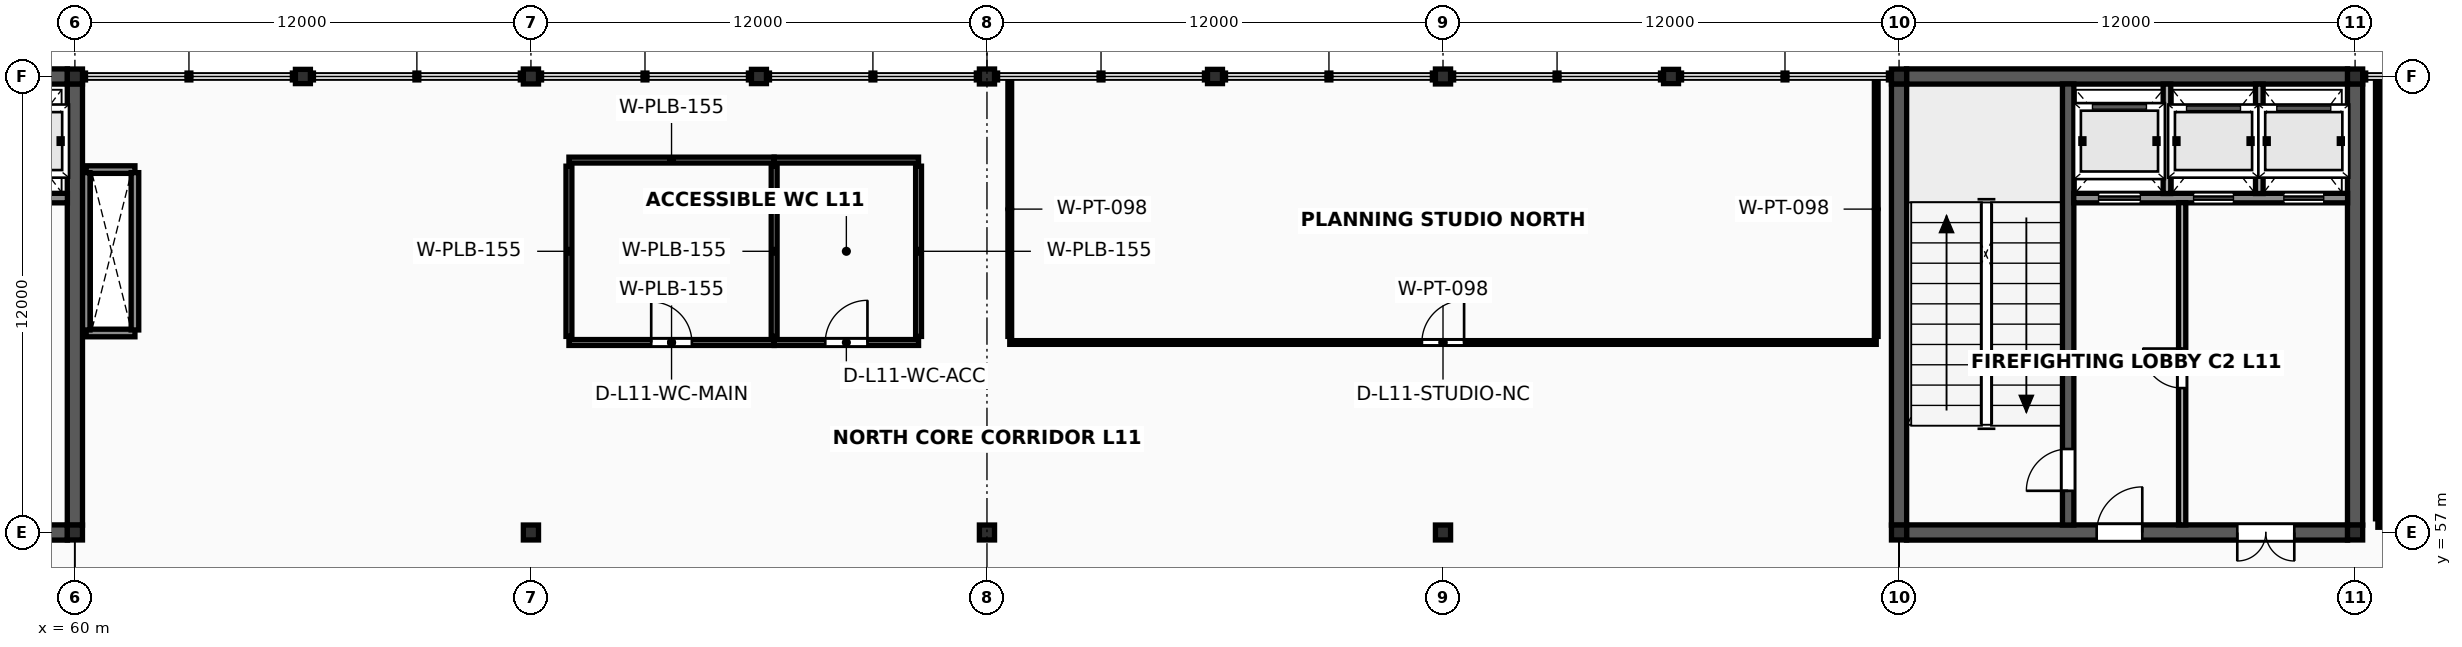
"""IFC4 building model, lengths in metres.
Left out: names, types, materials, properties, quantities, classifications, styles, units other than length and angle.
Written with IfcOpenShell. Run it as: python <this file> out.ifc"""

import sys

from ifc_helpers import new_model, si_unit, direction, frame, frame_2d, origin, origin_2d, place, context, subcontext, project, spatial, rectangle, i_section, extrude, element, fill, save


model = new_model("IFC4")
c1 = context("Model", 3, precision=1e-05, world=origin(), true_north=direction((0.0, 1.0)))
c2 = subcontext(c1, "Body", "Model", "MODEL_VIEW")
j1 = project(units=[si_unit("LENGTHUNIT", "METRE"), si_unit("PLANEANGLEUNIT", "RADIAN")], contexts=[c1])
p1 = place(None, origin())
s1 = spatial("IfcSite", under=j1, at=p1, CompositionType="ELEMENT")
p2 = place(p1, origin())
s2 = spatial("IfcBuilding", under=s1, at=p2, CompositionType="ELEMENT")
p3 = place(p2, frame((0.0, 0.0, 45.6)))
s3 = spatial("IfcBuildingStorey", under=s2, at=p3, CompositionType="ELEMENT", Elevation=45.6)
for number, where, z_axis, x_axis in (
    (1, (60.0, 57.0, 0.0), (0.0, 0.0, 1.0), (1.0, 0.0, 0.0)),
    (2, (60.0, 69.0, 0.0), (0.0, 0.0, 1.0), (1.0, 0.0, 0.0)),
    (3, (72.0, 57.0, 0.0), (0.0, 0.0, 1.0), (1.0, 0.0, 0.0)),
    (4, (72.0, 69.0, 0.0), (0.0, 0.0, 1.0), (1.0, 0.0, 0.0)),
    (5, (84.0, 57.0, 0.0), (0.0, 0.0, 1.0), (1.0, 0.0, 0.0)),
    (6, (84.0, 69.0, 0.0), (0.0, 0.0, 1.0), (1.0, 0.0, 0.0)),
    (7, (96.0, 57.0, 0.0), (0.0, 0.0, 1.0), (1.0, 0.0, 0.0)),
    (8, (96.0, 69.0, 0.0), (0.0, 0.0, 1.0), (1.0, 0.0, 0.0)),
    (9, (108.0, 57.0, 0.0), (0.0, 0.0, 1.0), (1.0, 0.0, 0.0)),
    (10, (108.0, 69.0, 0.0), (0.0, 0.0, 1.0), (1.0, 0.0, 0.0)),
    (11, (120.0, 57.0, 0.0), (0.0, 0.0, 1.0), (1.0, 0.0, 0.0)),
    (12, (120.0, 69.0, 0.0), (0.0, 0.0, 1.0), (1.0, 0.0, 0.0)),
):
    element("IfcColumn", number, at=place(p3, frame(where, z_axis=z_axis, x_axis=x_axis)), inside=s3, PredefinedType="COLUMN", context=c2, shape_type="SweptSolid", body=[
        extrude(i_section(OverallWidth=0.399, OverallDepth=0.393, WebThickness=0.023, FlangeThickness=0.037, FilletRadius=0.018, at=origin_2d()), origin(), (0.0, 0.0, 1.0), 4.0),
    ])
for number, where, z_axis, x_axis in (
    (13, (66.0, 69.0, 0.0), (0.0, 0.0, 1.0), (1.0, 0.0, 0.0)),
    (14, (78.0, 69.0, 0.0), (0.0, 0.0, 1.0), (1.0, 0.0, 0.0)),
    (15, (90.0, 69.0, 0.0), (0.0, 0.0, 1.0), (1.0, 0.0, 0.0)),
    (16, (102.0, 69.0, 0.0), (0.0, 0.0, 1.0), (1.0, 0.0, 0.0)),
):
    element("IfcColumn", number, at=place(p3, frame(where, z_axis=z_axis, x_axis=x_axis)), inside=s3, PredefinedType="COLUMN", context=c2, shape_type="SweptSolid", body=[
        extrude(i_section(OverallWidth=0.394, OverallDepth=0.375, WebThickness=0.017, FlangeThickness=0.028, FilletRadius=0.018, at=origin_2d()), origin(), (0.0, 0.0, 1.0), 4.0),
    ])
for number, where, z_axis, x_axis in (
    (17, (60.297, 62.25, 0.0), (0.0, 0.0, 1.0), (1.0, 0.0, 0.0)),
    (18, (60.297, 66.55, 0.0), (0.0, 0.0, 1.0), (1.0, 0.0, 0.0)),
):
    element("IfcWall", number, at=place(p3, frame(where, z_axis=z_axis, x_axis=x_axis)), inside=s3, PredefinedType="SOLIDWALL", context=c2, shape_type="SweptSolid", body=[
        extrude(rectangle(XDim=1.283, YDim=0.2, at=frame_2d((0.642, 0.0))), origin(), (0.0, 0.0, 1.0), 3.843),
    ])
for number, where, z_axis, x_axis in (
    (19, (60.297, 62.33, 0.0), (0.0, 0.0, 1.0), (0.0, 1.0, 0.0)),
    (20, (61.58, 62.33, 0.0), (0.0, 0.0, 1.0), (0.0, 1.0, 0.0)),
):
    element("IfcWall", number, at=place(p3, frame(where, z_axis=z_axis, x_axis=x_axis)), inside=s3, PredefinedType="SOLIDWALL", context=c2, shape_type="SweptSolid", body=[
        extrude(rectangle(XDim=4.14, YDim=0.2, at=frame_2d((2.07, 0.0))), origin(), (0.0, 0.0, 1.0), 3.843),
    ])
p4 = place(p3, frame((48.197, 57.0, 0.0), z_axis=(0.0, 0.0, 1.0), x_axis=(1.0, 0.0, 0.0)))
e21 = element("IfcWall", 21, at=p4, inside=s3, PredefinedType="SHEAR", context=c2, shape_type="SweptSolid", body=[
    extrude(rectangle(XDim=11.607, YDim=0.4, at=frame_2d((5.803, 0.0))), origin(), (0.0, 0.0, 1.0), 3.843),
])
p5 = place(p4, frame((5.004, 0.0, 0.0)))
e22 = element("IfcOpeningElement", 22, at=p5, cuts=e21, PredefinedType="OPENING", context=c2, shape_type="SweptSolid", body=[
    extrude(rectangle(XDim=1.2, YDim=2.2, at=frame_2d((0.6, 1.1))), frame((0.0, 0.215, 0.0), z_axis=(0.0, -1.0, 0.0), x_axis=(1.0, 0.0, 0.0)), (0.0, 0.0, 1.0), 0.43),
])
p6 = place(p4, frame((8.703, 0.0, 0.0)))
e23 = element("IfcOpeningElement", 23, at=p6, cuts=e21, PredefinedType="OPENING", context=c2, shape_type="SweptSolid", body=[
    extrude(rectangle(XDim=1.5, YDim=2.25, at=frame_2d((0.75, 1.125))), frame((0.0, 0.215, 0.0), z_axis=(0.0, -1.0, 0.0), x_axis=(1.0, 0.0, 0.0)), (0.0, 0.0, 1.0), 0.43),
])
p7 = place(p3, frame((48.197, 69.0, 0.0), z_axis=(0.0, 0.0, 1.0), x_axis=(1.0, 0.0, 0.0)))
e24 = element("IfcWall", 24, at=p7, inside=s3, PredefinedType="SHEAR", context=c2, shape_type="SweptSolid", body=[
    extrude(rectangle(XDim=11.607, YDim=0.4, at=frame_2d((5.803, 0.0))), origin(), (0.0, 0.0, 1.0), 3.843),
])
p8 = place(p3, frame((60.0, 57.194, 0.0), z_axis=(0.0, 0.0, 1.0), x_axis=(0.0, 1.0, 0.0)))
e25 = element("IfcWall", 25, at=p8, inside=s3, PredefinedType="SHEAR", context=c2, shape_type="SweptSolid", body=[
    extrude(rectangle(XDim=11.613, YDim=0.4, at=frame_2d((5.806, 0.0))), origin(), (0.0, 0.0, 1.0), 3.843),
])
p9 = place(p3, frame((52.597, 65.8, 0.0), z_axis=(0.0, 0.0, 1.0), x_axis=(1.0, 0.0, 0.0)))
e26 = element("IfcWall", 26, at=p9, inside=s3, PredefinedType="SOLIDWALL", context=c2, shape_type="SweptSolid", body=[
    extrude(rectangle(XDim=7.206, YDim=0.25, at=frame_2d((3.603, 0.0))), origin(), (0.0, 0.0, 1.0), 3.843),
])
p10 = place(p9, frame((0.653, 0.0, 0.0)))
e27 = element("IfcOpeningElement", 27, at=p10, cuts=e26, PredefinedType="OPENING", context=c2, shape_type="SweptSolid", body=[
    extrude(rectangle(XDim=1.1, YDim=2.24, at=frame_2d((0.55, 1.12))), frame((0.0, 0.14, 0.0), z_axis=(0.0, -1.0, 0.0), x_axis=(1.0, 0.0, 0.0)), (0.0, 0.0, 1.0), 0.28),
])
p11 = place(p9, frame((3.153, 0.0, 0.0)))
e28 = element("IfcOpeningElement", 28, at=p11, cuts=e26, PredefinedType="OPENING", context=c2, shape_type="SweptSolid", body=[
    extrude(rectangle(XDim=1.05, YDim=2.2, at=frame_2d((0.525, 1.1))), frame((0.0, 0.14, 0.0), z_axis=(0.0, -1.0, 0.0), x_axis=(1.0, 0.0, 0.0)), (0.0, 0.0, 1.0), 0.28),
])
p12 = place(p9, frame((5.528, 0.0, 0.0)))
e29 = element("IfcOpeningElement", 29, at=p12, cuts=e26, PredefinedType="OPENING", context=c2, shape_type="SweptSolid", body=[
    extrude(rectangle(XDim=1.05, YDim=2.2, at=frame_2d((0.525, 1.1))), frame((0.0, 0.14, 0.0), z_axis=(0.0, -1.0, 0.0), x_axis=(1.0, 0.0, 0.0)), (0.0, 0.0, 1.0), 0.28),
])
p13 = place(p3, frame((108.197, 57.0, 0.0), z_axis=(0.0, 0.0, 1.0), x_axis=(1.0, 0.0, 0.0)))
e30 = element("IfcWall", 30, at=p13, inside=s3, PredefinedType="SHEAR", context=c2, shape_type="SweptSolid", body=[
    extrude(rectangle(XDim=11.607, YDim=0.4, at=frame_2d((5.803, 0.0))), origin(), (0.0, 0.0, 1.0), 3.843),
])
p14 = place(p13, frame((5.004, 0.0, 0.0)))
e31 = element("IfcOpeningElement", 31, at=p14, cuts=e30, PredefinedType="OPENING", context=c2, shape_type="SweptSolid", body=[
    extrude(rectangle(XDim=1.2, YDim=2.2, at=frame_2d((0.6, 1.1))), frame((0.0, 0.215, 0.0), z_axis=(0.0, -1.0, 0.0), x_axis=(1.0, 0.0, 0.0)), (0.0, 0.0, 1.0), 0.43),
])
p15 = place(p13, frame((8.704, 0.0, 0.0)))
e32 = element("IfcOpeningElement", 32, at=p15, cuts=e30, PredefinedType="OPENING", context=c2, shape_type="SweptSolid", body=[
    extrude(rectangle(XDim=1.5, YDim=2.25, at=frame_2d((0.75, 1.125))), frame((0.0, 0.215, 0.0), z_axis=(0.0, -1.0, 0.0), x_axis=(1.0, 0.0, 0.0)), (0.0, 0.0, 1.0), 0.43),
])
p16 = place(p3, frame((108.197, 69.0, 0.0), z_axis=(0.0, 0.0, 1.0), x_axis=(1.0, 0.0, 0.0)))
e33 = element("IfcWall", 33, at=p16, inside=s3, PredefinedType="SHEAR", context=c2, shape_type="SweptSolid", body=[
    extrude(rectangle(XDim=11.607, YDim=0.4, at=frame_2d((5.803, 0.0))), origin(), (0.0, 0.0, 1.0), 3.843),
])
for number, where, z_axis, x_axis in (
    (34, (108.0, 57.194, 0.0), (0.0, 0.0, 1.0), (0.0, 1.0, 0.0)),
    (35, (120.0, 57.194, 0.0), (0.0, 0.0, 1.0), (0.0, 1.0, 0.0)),
):
    element("IfcWall", number, at=place(p3, frame(where, z_axis=z_axis, x_axis=x_axis)), inside=s3, PredefinedType="SHEAR", context=c2, shape_type="SweptSolid", body=[
        extrude(rectangle(XDim=11.613, YDim=0.4, at=frame_2d((5.806, 0.0))), origin(), (0.0, 0.0, 1.0), 3.843),
    ])
p17 = place(p3, frame((112.45, 57.197, 0.0), z_axis=(0.0, 0.0, 1.0), x_axis=(0.0, 1.0, 0.0)))
e36 = element("IfcWall", 36, at=p17, inside=s3, PredefinedType="SHEAR", context=c2, shape_type="SweptSolid", body=[
    extrude(rectangle(XDim=11.606, YDim=0.3, at=frame_2d((5.803, 0.0))), origin(), (0.0, 0.0, 1.0), 3.843),
])
p18 = place(p17, frame((0.9, 0.0, 0.0)))
e37 = element("IfcOpeningElement", 37, at=p18, cuts=e36, PredefinedType="OPENING", context=c2, shape_type="SweptSolid", body=[
    extrude(rectangle(XDim=1.1, YDim=2.2, at=frame_2d((0.55, 1.1))), frame((0.0, 0.165, 0.0), z_axis=(0.0, -1.0, 0.0), x_axis=(1.0, 0.0, 0.0)), (0.0, 0.0, 1.0), 0.33),
])
p19 = place(p3, frame((112.597, 65.8, 0.0), z_axis=(0.0, 0.0, 1.0), x_axis=(1.0, 0.0, 0.0)))
e38 = element("IfcWall", 38, at=p19, inside=s3, PredefinedType="SOLIDWALL", context=c2, shape_type="SweptSolid", body=[
    extrude(rectangle(XDim=7.206, YDim=0.25, at=frame_2d((3.603, 0.0))), origin(), (0.0, 0.0, 1.0), 3.843),
])
p20 = place(p19, frame((0.653, 0.0, 0.0)))
e39 = element("IfcOpeningElement", 39, at=p20, cuts=e38, PredefinedType="OPENING", context=c2, shape_type="SweptSolid", body=[
    extrude(rectangle(XDim=1.1, YDim=2.24, at=frame_2d((0.55, 1.12))), frame((0.0, 0.14, 0.0), z_axis=(0.0, -1.0, 0.0), x_axis=(1.0, 0.0, 0.0)), (0.0, 0.0, 1.0), 0.28),
])
p21 = place(p19, frame((3.153, 0.0, 0.0)))
e40 = element("IfcOpeningElement", 40, at=p21, cuts=e38, PredefinedType="OPENING", context=c2, shape_type="SweptSolid", body=[
    extrude(rectangle(XDim=1.05, YDim=2.2, at=frame_2d((0.525, 1.1))), frame((0.0, 0.14, 0.0), z_axis=(0.0, -1.0, 0.0), x_axis=(1.0, 0.0, 0.0)), (0.0, 0.0, 1.0), 0.28),
])
p22 = place(p19, frame((5.528, 0.0, 0.0)))
e41 = element("IfcOpeningElement", 41, at=p22, cuts=e38, PredefinedType="OPENING", context=c2, shape_type="SweptSolid", body=[
    extrude(rectangle(XDim=1.05, YDim=2.2, at=frame_2d((0.525, 1.1))), frame((0.0, 0.14, 0.0), z_axis=(0.0, -1.0, 0.0), x_axis=(1.0, 0.0, 0.0)), (0.0, 0.0, 1.0), 0.28),
])
for number, where, z_axis, x_axis in (
    (42, (115.05, 65.92, 0.0), (0.0, 0.0, 1.0), (0.0, 1.0, 0.0)),
    (43, (117.48, 65.92, 0.0), (0.0, 0.0, 1.0), (0.0, 1.0, 0.0)),
):
    element("IfcWall", number, at=place(p3, frame(where, z_axis=z_axis, x_axis=x_axis)), inside=s3, PredefinedType="SOLIDWALL", context=c2, shape_type="SweptSolid", body=[
        extrude(rectangle(XDim=2.88, YDim=0.2, at=frame_2d((1.44, 0.0))), origin(), (0.0, 0.0, 1.0), 3.833),
    ])
p23 = place(p3, frame((115.45, 57.2, 0.0), z_axis=(0.0, 0.0, 1.0), x_axis=(0.0, 1.0, 0.0)))
e44 = element("IfcWall", 44, at=p23, inside=s3, PredefinedType="SOLIDWALL", context=c2, shape_type="SweptSolid", body=[
    extrude(rectangle(XDim=8.48, YDim=0.19, at=frame_2d((4.24, 0.0))), origin(), (0.0, 0.0, 1.0), 3.833),
])
p24 = place(p23, frame((3.6, 0.0, 0.0)))
e45 = element("IfcOpeningElement", 45, at=p24, cuts=e44, PredefinedType="OPENING", context=c2, shape_type="SweptSolid", body=[
    extrude(rectangle(XDim=1.04, YDim=2.18, at=frame_2d((0.52, 1.09))), frame((0.0, 0.11, 0.0), z_axis=(0.0, -1.0, 0.0), x_axis=(1.0, 0.0, 0.0)), (0.0, 0.0, 1.0), 0.22),
])
p25 = place(p3, frame((73.0, 62.0, 0.0), z_axis=(0.0, 0.0, 1.0), x_axis=(1.0, 0.0, 0.0)))
e46 = element("IfcWall", 46, at=p25, inside=s3, PredefinedType="PLUMBINGWALL", context=c2, shape_type="SweptSolid", body=[
    extrude(rectangle(XDim=5.4, YDim=0.155, at=frame_2d((2.7, 0.0))), origin(), (0.0, 0.0, 1.0), 2.88),
])
p26 = place(p25, frame((2.165, 0.0, 0.0)))
e47 = element("IfcOpeningElement", 47, at=p26, cuts=e46, PredefinedType="OPENING", context=c2, shape_type="SweptSolid", body=[
    extrude(rectangle(XDim=1.07, YDim=2.19, at=frame_2d((0.535, 1.095))), frame((0.0, 0.093, 0.0), z_axis=(0.0, -1.0, 0.0), x_axis=(1.0, 0.0, 0.0)), (0.0, 0.0, 1.0), 0.185),
])
p27 = place(p3, frame((73.0, 66.8, 0.0), z_axis=(0.0, 0.0, 1.0), x_axis=(1.0, 0.0, 0.0)))
e48 = element("IfcWall", 48, at=p27, inside=s3, PredefinedType="PLUMBINGWALL", context=c2, shape_type="SweptSolid", body=[
    extrude(rectangle(XDim=5.4, YDim=0.155, at=frame_2d((2.7, 0.0))), origin(), (0.0, 0.0, 1.0), 2.88),
])
for number, where, z_axis, x_axis in (
    (49, (73.0, 62.16, 0.0), (0.0, 0.0, 1.0), (0.0, 1.0, 0.0)),
    (50, (78.4, 62.16, 0.0), (0.0, 0.0, 1.0), (0.0, 1.0, 0.0)),
):
    element("IfcWall", number, at=place(p3, frame(where, z_axis=z_axis, x_axis=x_axis)), inside=s3, PredefinedType="PLUMBINGWALL", context=c2, shape_type="SweptSolid", body=[
        extrude(rectangle(XDim=4.48, YDim=0.155, at=frame_2d((2.24, 0.0))), origin(), (0.0, 0.0, 1.0), 2.88),
    ])
p28 = place(p3, frame((78.4, 62.0, 0.0), z_axis=(0.0, 0.0, 1.0), x_axis=(1.0, 0.0, 0.0)))
e51 = element("IfcWall", 51, at=p28, inside=s3, PredefinedType="PLUMBINGWALL", context=c2, shape_type="SweptSolid", body=[
    extrude(rectangle(XDim=3.8, YDim=0.155, at=frame_2d((1.9, 0.0))), origin(), (0.0, 0.0, 1.0), 2.88),
])
p29 = place(p28, frame((1.345, 0.0, 0.0)))
e52 = element("IfcOpeningElement", 52, at=p29, cuts=e51, PredefinedType="OPENING", context=c2, shape_type="SweptSolid", body=[
    extrude(rectangle(XDim=1.11, YDim=2.21, at=frame_2d((0.555, 1.105))), frame((0.0, 0.093, 0.0), z_axis=(0.0, -1.0, 0.0), x_axis=(1.0, 0.0, 0.0)), (0.0, 0.0, 1.0), 0.185),
])
p30 = place(p3, frame((78.4, 66.8, 0.0), z_axis=(0.0, 0.0, 1.0), x_axis=(1.0, 0.0, 0.0)))
e53 = element("IfcWall", 53, at=p30, inside=s3, PredefinedType="PLUMBINGWALL", context=c2, shape_type="SweptSolid", body=[
    extrude(rectangle(XDim=3.8, YDim=0.155, at=frame_2d((1.9, 0.0))), origin(), (0.0, 0.0, 1.0), 2.88),
])
p31 = place(p3, frame((82.2, 62.16, 0.0), z_axis=(0.0, 0.0, 1.0), x_axis=(0.0, 1.0, 0.0)))
e54 = element("IfcWall", 54, at=p31, inside=s3, PredefinedType="PLUMBINGWALL", context=c2, shape_type="SweptSolid", body=[
    extrude(rectangle(XDim=4.48, YDim=0.155, at=frame_2d((2.24, 0.0))), origin(), (0.0, 0.0, 1.0), 2.88),
])
p32 = place(p3, frame((84.6, 62.0, 0.0), z_axis=(0.0, 0.0, 1.0), x_axis=(1.0, 0.0, 0.0)))
e55 = element("IfcWall", 55, at=p32, inside=s3, PredefinedType="PARTITIONING", context=c2, shape_type="SweptSolid", body=[
    extrude(rectangle(XDim=22.8, YDim=0.098, at=frame_2d((11.4, 0.0))), origin(), (0.0, 0.0, 1.0), 2.88),
])
p33 = place(p32, frame((10.845, 0.0, 0.0)))
e56 = element("IfcOpeningElement", 56, at=p33, cuts=e55, PredefinedType="OPENING", context=c2, shape_type="SweptSolid", body=[
    extrude(rectangle(XDim=1.11, YDim=2.21, at=frame_2d((0.555, 1.105))), frame((0.0, 0.064, 0.0), z_axis=(0.0, -1.0, 0.0), x_axis=(1.0, 0.0, 0.0)), (0.0, 0.0, 1.0), 0.128),
])
for number, where, z_axis, x_axis in (
    (57, (84.6, 62.16, 0.0), (0.0, 0.0, 1.0), (0.0, 1.0, 0.0)),
    (58, (107.4, 62.16, 0.0), (0.0, 0.0, 1.0), (0.0, 1.0, 0.0)),
):
    element("IfcWall", number, at=place(p3, frame(where, z_axis=z_axis, x_axis=x_axis)), inside=s3, PredefinedType="PARTITIONING", context=c2, shape_type="SweptSolid", body=[
        extrude(rectangle(XDim=6.7, YDim=0.098, at=frame_2d((3.35, 0.0))), origin(), (0.0, 0.0, 1.0), 2.88),
    ])
p34 = place(p3, frame((120.6, 57.2, 0.0), z_axis=(0.0, 0.0, 1.0), x_axis=(1.0, 0.0, 0.0)))
e59 = element("IfcWall", 59, at=p34, inside=s3, PredefinedType="PARTITIONING", context=c2, shape_type="SweptSolid", body=[
    extrude(rectangle(XDim=23.26, YDim=0.125, at=frame_2d((11.63, 0.0))), origin(), (0.0, 0.0, 1.0), 2.88),
])
p35 = place(p34, frame((7.043, 0.0, 0.0)))
e60 = element("IfcOpeningElement", 60, at=p35, cuts=e59, PredefinedType="OPENING", context=c2, shape_type="SweptSolid", body=[
    extrude(rectangle(XDim=1.73, YDim=2.37, at=frame_2d((0.865, 1.185))), frame((0.0, 0.077, 0.0), z_axis=(0.0, -1.0, 0.0), x_axis=(1.0, 0.0, 0.0)), (0.0, 0.0, 1.0), 0.155),
])
p36 = place(p3, frame((120.6, 57.36, 0.0), z_axis=(0.0, 0.0, 1.0), x_axis=(0.0, 1.0, 0.0)))
e61 = element("IfcWall", 61, at=p36, inside=s3, PredefinedType="PARTITIONING", context=c2, shape_type="SweptSolid", body=[
    extrude(rectangle(XDim=11.5, YDim=0.125, at=frame_2d((5.75, 0.0))), origin(), (0.0, 0.0, 1.0), 2.88),
])
p37 = place(p18, origin())
e62 = element("IfcDoor", 62, at=p37, inside=s3, OperationType="SINGLE_SWING_LEFT", PredefinedType="DOOR", context=c2, shape_type="SweptSolid", body=[
    extrude(rectangle(XDim=1.1, YDim=2.2, at=frame_2d((0.55, 1.1))), frame((0.0, 0.025, 0.0), z_axis=(0.0, -1.0, 0.0), x_axis=(1.0, 0.0, 0.0)), (0.0, 0.0, 1.0), 0.05),
])
fill(e37, e62)
p38 = place(p24, origin())
e63 = element("IfcDoor", 63, at=p38, inside=s3, OperationType="SINGLE_SWING_RIGHT", PredefinedType="DOOR", context=c2, shape_type="SweptSolid", body=[
    extrude(rectangle(XDim=1.04, YDim=2.18, at=frame_2d((0.52, 1.09))), frame((0.0, 0.025, 0.0), z_axis=(0.0, -1.0, 0.0), x_axis=(1.0, 0.0, 0.0)), (0.0, 0.0, 1.0), 0.05),
])
fill(e45, e63)
p39 = place(p14, origin())
e64 = element("IfcDoor", 64, at=p39, inside=s3, OperationType="SINGLE_SWING_RIGHT", PredefinedType="DOOR", context=c2, shape_type="SweptSolid", body=[
    extrude(rectangle(XDim=1.2, YDim=2.2, at=frame_2d((0.6, 1.1))), frame((0.0, 0.025, 0.0), z_axis=(0.0, -1.0, 0.0), x_axis=(1.0, 0.0, 0.0)), (0.0, 0.0, 1.0), 0.05),
])
fill(e31, e64)
p40 = place(p15, origin())
e65 = element("IfcDoor", 65, at=p40, inside=s3, OperationType="DOUBLE_DOOR_SINGLE_SWING", PredefinedType="DOOR", context=c2, shape_type="SweptSolid", body=[
    extrude(rectangle(XDim=1.5, YDim=2.25, at=frame_2d((0.75, 1.125))), frame((0.0, 0.025, 0.0), z_axis=(0.0, -1.0, 0.0), x_axis=(1.0, 0.0, 0.0)), (0.0, 0.0, 1.0), 0.05),
])
fill(e32, e65)
p41 = place(p20, origin())
e66 = element("IfcDoor", 66, at=p41, inside=s3, OperationType="SLIDING_TO_LEFT", PredefinedType="USERDEFINED", context=c2, shape_type="SweptSolid", body=[
    extrude(rectangle(XDim=1.1, YDim=2.24, at=frame_2d((0.55, 1.12))), frame((0.0, 0.025, 0.0), z_axis=(0.0, -1.0, 0.0), x_axis=(1.0, 0.0, 0.0)), (0.0, 0.0, 1.0), 0.05),
])
fill(e39, e66)
p42 = place(p21, origin())
e67 = element("IfcDoor", 67, at=p42, inside=s3, OperationType="SLIDING_TO_LEFT", PredefinedType="USERDEFINED", context=c2, shape_type="SweptSolid", body=[
    extrude(rectangle(XDim=1.05, YDim=2.2, at=frame_2d((0.525, 1.1))), frame((0.0, 0.025, 0.0), z_axis=(0.0, -1.0, 0.0), x_axis=(1.0, 0.0, 0.0)), (0.0, 0.0, 1.0), 0.05),
])
fill(e40, e67)
p43 = place(p22, origin())
e68 = element("IfcDoor", 68, at=p43, inside=s3, OperationType="SLIDING_TO_LEFT", PredefinedType="USERDEFINED", context=c2, shape_type="SweptSolid", body=[
    extrude(rectangle(XDim=1.05, YDim=2.2, at=frame_2d((0.525, 1.1))), frame((0.0, 0.025, 0.0), z_axis=(0.0, -1.0, 0.0), x_axis=(1.0, 0.0, 0.0)), (0.0, 0.0, 1.0), 0.05),
])
fill(e41, e68)
p44 = place(p26, origin())
e69 = element("IfcDoor", 69, at=p44, inside=s3, OperationType="SINGLE_SWING_LEFT", PredefinedType="DOOR", context=c2, shape_type="SweptSolid", body=[
    extrude(rectangle(XDim=1.07, YDim=2.19, at=frame_2d((0.535, 1.095))), frame((0.0, 0.025, 0.0), z_axis=(0.0, -1.0, 0.0), x_axis=(1.0, 0.0, 0.0)), (0.0, 0.0, 1.0), 0.05),
])
fill(e47, e69)
p45 = place(p29, origin())
e70 = element("IfcDoor", 70, at=p45, inside=s3, OperationType="SINGLE_SWING_RIGHT", PredefinedType="DOOR", context=c2, shape_type="SweptSolid", body=[
    extrude(rectangle(XDim=1.11, YDim=2.21, at=frame_2d((0.555, 1.105))), frame((0.0, 0.025, 0.0), z_axis=(0.0, -1.0, 0.0), x_axis=(1.0, 0.0, 0.0)), (0.0, 0.0, 1.0), 0.05),
])
fill(e52, e70)
p46 = place(p33, origin())
e71 = element("IfcDoor", 71, at=p46, inside=s3, OperationType="SINGLE_SWING_RIGHT", PredefinedType="DOOR", context=c2, shape_type="SweptSolid", body=[
    extrude(rectangle(XDim=1.11, YDim=2.21, at=frame_2d((0.555, 1.105))), frame((0.0, 0.025, 0.0), z_axis=(0.0, -1.0, 0.0), x_axis=(1.0, 0.0, 0.0)), (0.0, 0.0, 1.0), 0.05),
])
fill(e56, e71)
save(model, sys.argv[1])
